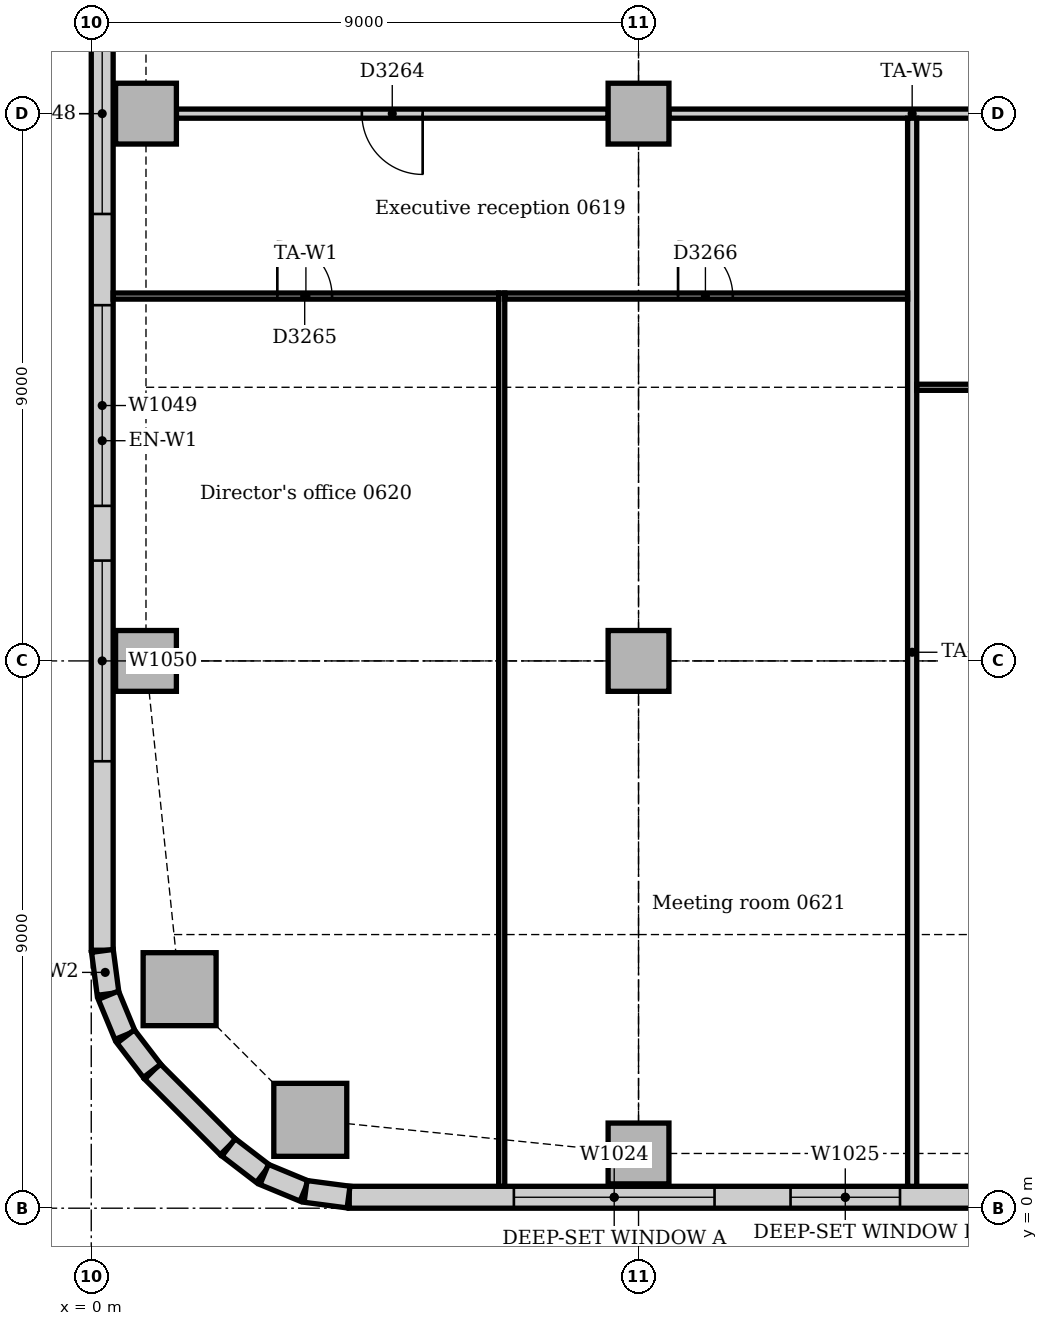
"""IFC4 building model, lengths in metres.
Left out: names, types, materials, properties, quantities, classifications, styles, units other than length and angle.
Written with IfcOpenShell. Run it as: python <this file> out.ifc"""

import sys

from ifc_helpers import new_model, si_unit, direction, frame, frame_2d, origin, origin_2d, place, context, subcontext, project, spatial, rectangle, extrude, element, fill, save


model = new_model("IFC4")
c1 = context("Model", 3, precision=1e-05, world=origin(), true_north=direction((0.0, 1.0)))
c2 = subcontext(c1, "Body", "Model", "MODEL_VIEW")
j1 = project(units=[si_unit("LENGTHUNIT", "METRE"), si_unit("PLANEANGLEUNIT", "RADIAN")], contexts=[c1])
p1 = place(None, origin())
s1 = spatial("IfcSite", under=j1, at=p1, CompositionType="ELEMENT")
p2 = place(p1, origin())
s2 = spatial("IfcBuilding", under=s1, at=p2, CompositionType="ELEMENT")
p3 = place(p2, frame((0.0, 0.0, 30.0)))
s3 = spatial("IfcBuildingStorey", under=s2, at=p3, CompositionType="ELEMENT", Elevation=30.0)
for number, where, z_axis, x_axis in (
    (1, (3.602, 1.453, 0.0), (0.0, 0.0, 1.0), (1.0, 0.0, 0.0)),
    (2, (1.453, 3.602, 0.0), (0.0, 0.0, 1.0), (1.0, 0.0, 0.0)),
):
    element("IfcColumn", number, at=place(p3, frame(where, z_axis=z_axis, x_axis=x_axis)), inside=s3, PredefinedType="COLUMN", context=c2, shape_type="SweptSolid", body=[
        extrude(rectangle(XDim=1.2, YDim=1.2, at=origin_2d()), origin(), (0.0, 0.0, 1.0), 3.85),
    ])
for number, where, z_axis, x_axis in (
    (3, (9.0, 0.9, 0.0), (0.0, 0.0, 1.0), (1.0, 0.0, 0.0)),
    (4, (0.9, 9.0, 0.0), (0.0, 0.0, 1.0), (1.0, 0.0, 0.0)),
    (5, (0.9, 18.0, 0.0), (0.0, 0.0, 1.0), (1.0, 0.0, 0.0)),
    (6, (9.0, 9.0, 0.0), (0.0, 0.0, 1.0), (1.0, 0.0, 0.0)),
    (7, (9.0, 18.0, 0.0), (0.0, 0.0, 1.0), (1.0, 0.0, 0.0)),
):
    element("IfcColumn", number, at=place(p3, frame(where, z_axis=z_axis, x_axis=x_axis)), inside=s3, PredefinedType="COLUMN", context=c2, shape_type="SweptSolid", body=[
        extrude(rectangle(XDim=1.0, YDim=1.0, at=origin_2d()), origin(), (0.0, 0.0, 1.0), 3.85),
    ])
p4 = place(p3, frame((4.243, 0.18, 0.0), z_axis=(0.0, 0.0, 1.0), x_axis=(1.0, 0.0, 0.0)))
e8 = element("IfcWall", 8, at=p4, inside=s3, PredefinedType="STANDARD", context=c2, shape_type="SweptSolid", body=[
    extrude(rectangle(XDim=44.015, YDim=0.36, at=frame_2d((22.007, 0.0))), origin(), (0.0, 0.0, 1.0), 3.85),
])
p5 = place(p4, frame((2.707, 0.0, 0.9)))
e9 = element("IfcOpeningElement", 9, at=p5, cuts=e8, PredefinedType="OPENING", context=c2, shape_type="SweptSolid", body=[
    extrude(rectangle(XDim=3.3, YDim=1.6, at=frame_2d((1.65, 0.8))), frame((0.0, 0.19, 0.0), z_axis=(0.0, -1.0, 0.0), x_axis=(1.0, 0.0, 0.0)), (0.0, 0.0, 1.0), 0.38),
])
p6 = place(p4, frame((7.257, 0.0, 0.9)))
e10 = element("IfcOpeningElement", 10, at=p6, cuts=e8, PredefinedType="OPENING", context=c2, shape_type="SweptSolid", body=[
    extrude(rectangle(XDim=1.8, YDim=1.6, at=frame_2d((0.9, 0.8))), frame((0.0, 0.19, 0.0), z_axis=(0.0, -1.0, 0.0), x_axis=(1.0, 0.0, 0.0)), (0.0, 0.0, 1.0), 0.38),
])
p7 = place(p4, frame((11.357, 0.0, 0.9)))
e11 = element("IfcOpeningElement", 11, at=p7, cuts=e8, PredefinedType="OPENING", context=c2, shape_type="SweptSolid", body=[
    extrude(rectangle(XDim=3.3, YDim=1.6, at=frame_2d((1.65, 0.8))), frame((0.0, 0.19, 0.0), z_axis=(0.0, -1.0, 0.0), x_axis=(1.0, 0.0, 0.0)), (0.0, 0.0, 1.0), 0.38),
])
p8 = place(p4, frame((16.307, 0.0, 0.9)))
e12 = element("IfcOpeningElement", 12, at=p8, cuts=e8, PredefinedType="OPENING", context=c2, shape_type="SweptSolid", body=[
    extrude(rectangle(XDim=1.8, YDim=1.6, at=frame_2d((0.9, 0.8))), frame((0.0, 0.19, 0.0), z_axis=(0.0, -1.0, 0.0), x_axis=(1.0, 0.0, 0.0)), (0.0, 0.0, 1.0), 0.38),
])
p9 = place(p4, frame((20.357, 0.0, 0.9)))
e13 = element("IfcOpeningElement", 13, at=p9, cuts=e8, PredefinedType="OPENING", context=c2, shape_type="SweptSolid", body=[
    extrude(rectangle(XDim=3.3, YDim=1.6, at=frame_2d((1.65, 0.8))), frame((0.0, 0.19, 0.0), z_axis=(0.0, -1.0, 0.0), x_axis=(1.0, 0.0, 0.0)), (0.0, 0.0, 1.0), 0.38),
])
p10 = place(p4, frame((25.307, 0.0, 0.9)))
e14 = element("IfcOpeningElement", 14, at=p10, cuts=e8, PredefinedType="OPENING", context=c2, shape_type="SweptSolid", body=[
    extrude(rectangle(XDim=1.8, YDim=1.6, at=frame_2d((0.9, 0.8))), frame((0.0, 0.19, 0.0), z_axis=(0.0, -1.0, 0.0), x_axis=(1.0, 0.0, 0.0)), (0.0, 0.0, 1.0), 0.38),
])
p11 = place(p4, frame((29.357, 0.0, 0.9)))
e15 = element("IfcOpeningElement", 15, at=p11, cuts=e8, PredefinedType="OPENING", context=c2, shape_type="SweptSolid", body=[
    extrude(rectangle(XDim=3.3, YDim=1.6, at=frame_2d((1.65, 0.8))), frame((0.0, 0.19, 0.0), z_axis=(0.0, -1.0, 0.0), x_axis=(1.0, 0.0, 0.0)), (0.0, 0.0, 1.0), 0.38),
])
p12 = place(p4, frame((33.857, 0.0, 0.9)))
e16 = element("IfcOpeningElement", 16, at=p12, cuts=e8, PredefinedType="OPENING", context=c2, shape_type="SweptSolid", body=[
    extrude(rectangle(XDim=3.3, YDim=1.6, at=frame_2d((1.65, 0.8))), frame((0.0, 0.19, 0.0), z_axis=(0.0, -1.0, 0.0), x_axis=(1.0, 0.0, 0.0)), (0.0, 0.0, 1.0), 0.38),
])
p13 = place(p4, frame((38.357, 0.0, 0.9)))
e17 = element("IfcOpeningElement", 17, at=p13, cuts=e8, PredefinedType="OPENING", context=c2, shape_type="SweptSolid", body=[
    extrude(rectangle(XDim=3.3, YDim=1.6, at=frame_2d((1.65, 0.8))), frame((0.0, 0.19, 0.0), z_axis=(0.0, -1.0, 0.0), x_axis=(1.0, 0.0, 0.0)), (0.0, 0.0, 1.0), 0.38),
])
p14 = place(p3, frame((0.18, 21.0, 0.0), z_axis=(0.0, 0.0, 1.0), x_axis=(0.0, -1.0, 0.0)))
e18 = element("IfcWall", 18, at=p14, inside=s3, PredefinedType="STANDARD", context=c2, shape_type="SweptSolid", body=[
    extrude(rectangle(XDim=16.757, YDim=0.36, at=frame_2d((8.379, 0.0))), origin(), (0.0, 0.0, 1.0), 3.85),
])
p15 = place(p14, frame((1.35, 0.0, 0.9)))
e19 = element("IfcOpeningElement", 19, at=p15, cuts=e18, PredefinedType="OPENING", context=c2, shape_type="SweptSolid", body=[
    extrude(rectangle(XDim=3.3, YDim=1.6, at=frame_2d((1.65, 0.8))), frame((0.0, 0.19, 0.0), z_axis=(0.0, -1.0, 0.0), x_axis=(1.0, 0.0, 0.0)), (0.0, 0.0, 1.0), 0.38),
])
p16 = place(p14, frame((6.15, 0.0, 0.9)))
e20 = element("IfcOpeningElement", 20, at=p16, cuts=e18, PredefinedType="OPENING", context=c2, shape_type="SweptSolid", body=[
    extrude(rectangle(XDim=3.3, YDim=1.6, at=frame_2d((1.65, 0.8))), frame((0.0, 0.19, 0.0), z_axis=(0.0, -1.0, 0.0), x_axis=(1.0, 0.0, 0.0)), (0.0, 0.0, 1.0), 0.38),
])
p17 = place(p14, frame((10.35, 0.0, 0.9)))
e21 = element("IfcOpeningElement", 21, at=p17, cuts=e18, PredefinedType="OPENING", context=c2, shape_type="SweptSolid", body=[
    extrude(rectangle(XDim=3.3, YDim=1.6, at=frame_2d((1.65, 0.8))), frame((0.0, 0.19, 0.0), z_axis=(0.0, -1.0, 0.0), x_axis=(1.0, 0.0, 0.0)), (0.0, 0.0, 1.0), 0.38),
])
p18 = place(p3, frame((1.006, 2.249, 0.0), z_axis=(0.0, 0.0, 1.0), x_axis=(0.707106781187, -0.707106781187, 0.0)))
e22 = element("IfcWall", 22, at=p18, inside=s3, PredefinedType="STANDARD", context=c2, shape_type="SweptSolid", body=[
    extrude(rectangle(XDim=1.757, YDim=0.36, at=frame_2d((0.879, 0.0))), origin(), (0.0, 0.0, 1.0), 3.85),
])
for number, where, z_axis, x_axis in (
    (23, (0.183, 4.231, 0.0), (0.0, 0.0, 1.0), (0.131, -0.991, 0.0)),
    (24, (0.282, 3.503, 0.0), (0.0, 0.0, 1.0), (0.383, -0.924, 0.0)),
):
    element("IfcWall", number, at=place(p3, frame(where, z_axis=z_axis, x_axis=x_axis)), inside=s3, PredefinedType="STANDARD", context=c2, shape_type="SweptSolid", body=[
        extrude(rectangle(XDim=0.713, YDim=0.36, at=frame_2d((0.356, 0.0))), origin(), (0.0, 0.0, 1.0), 3.85),
    ])
for number, where, z_axis, x_axis in (
    (25, (0.566, 2.825, 0.0), (0.0, 0.0, 1.0), (0.609, -0.793, 0.0)),
    (26, (2.259, 1.0, 0.0), (0.0, 0.0, 1.0), (0.793, -0.609, 0.0)),
):
    element("IfcWall", number, at=place(p3, frame(where, z_axis=z_axis, x_axis=x_axis)), inside=s3, PredefinedType="STANDARD", context=c2, shape_type="SweptSolid", body=[
        extrude(rectangle(XDim=0.713, YDim=0.36, at=frame_2d((0.357, 0.0))), origin(), (0.0, 0.0, 1.0), 3.85),
    ])
for number, where, z_axis, x_axis in (
    (27, (2.844, 0.555, 0.0), (0.0, 0.0, 1.0), (0.924, -0.383, 0.0)),
    (28, (3.524, 0.276, 0.0), (0.0, 0.0, 1.0), (0.991, -0.131, 0.0)),
):
    element("IfcWall", number, at=place(p3, frame(where, z_axis=z_axis, x_axis=x_axis)), inside=s3, PredefinedType="STANDARD", context=c2, shape_type="SweptSolid", body=[
        extrude(rectangle(XDim=0.713, YDim=0.36, at=frame_2d((0.356, 0.0))), origin(), (0.0, 0.0, 1.0), 3.85),
    ])
p19 = place(p3, frame((9.5, 18.0, 0.0), z_axis=(0.0, 0.0, 1.0), x_axis=(1.0, 0.0, 0.0)))
e29 = element("IfcWall", 29, at=p19, inside=s3, PredefinedType="PARTITIONING", context=c2, shape_type="SweptSolid", body=[
    extrude(rectangle(XDim=8.0, YDim=0.15, at=frame_2d((4.0, 0.0))), origin(), (0.0, 0.0, 1.0), 3.15),
])
p20 = place(p3, frame((1.4, 18.0, 0.0), z_axis=(0.0, 0.0, 1.0), x_axis=(1.0, 0.0, 0.0)))
e30 = element("IfcWall", 30, at=p20, inside=s3, PredefinedType="PARTITIONING", context=c2, shape_type="SweptSolid", body=[
    extrude(rectangle(XDim=7.1, YDim=0.15, at=frame_2d((3.55, 0.0))), origin(), (0.0, 0.0, 1.0), 3.15),
])
p21 = place(p20, frame((3.05, 0.0, 0.0)))
e31 = element("IfcOpeningElement", 31, at=p21, cuts=e30, PredefinedType="OPENING", context=c2, shape_type="SweptSolid", body=[
    extrude(rectangle(XDim=1.0, YDim=2.1, at=frame_2d((0.5, 1.05))), frame((0.0, 0.085, 0.0), z_axis=(0.0, -1.0, 0.0), x_axis=(1.0, 0.0, 0.0)), (0.0, 0.0, 1.0), 0.17),
])
p22 = place(p3, frame((13.5, 0.36, 0.0), z_axis=(0.0, 0.0, 1.0), x_axis=(0.0, 1.0, 0.0)))
e32 = element("IfcWall", 32, at=p22, inside=s3, PredefinedType="PARTITIONING", context=c2, shape_type="SweptSolid", body=[
    extrude(rectangle(XDim=17.565, YDim=0.15, at=frame_2d((8.783, 0.0))), origin(), (0.0, 0.0, 1.0), 3.85),
])
p23 = place(p3, frame((13.575, 13.5, 0.0), z_axis=(0.0, 0.0, 1.0), x_axis=(1.0, 0.0, 0.0)))
e33 = element("IfcWall", 33, at=p23, inside=s3, PredefinedType="PARTITIONING", context=c2, shape_type="SweptSolid", body=[
    extrude(rectangle(XDim=17.975, YDim=0.1, at=frame_2d((8.988, 0.0))), origin(), (0.0, 0.0, 1.0), 3.35),
])
p24 = place(p23, frame((4.1, 0.0, 0.0)))
e34 = element("IfcOpeningElement", 34, at=p24, cuts=e33, PredefinedType="OPENING", context=c2, shape_type="SweptSolid", body=[
    extrude(rectangle(XDim=0.9, YDim=2.1, at=frame_2d((0.45, 1.05))), frame((0.0, 0.06, 0.0), z_axis=(0.0, -1.0, 0.0), x_axis=(1.0, 0.0, 0.0)), (0.0, 0.0, 1.0), 0.12),
])
p25 = place(p23, frame((12.925, 0.0, 0.0)))
e35 = element("IfcOpeningElement", 35, at=p25, cuts=e33, PredefinedType="OPENING", context=c2, shape_type="SweptSolid", body=[
    extrude(rectangle(XDim=0.9, YDim=2.1, at=frame_2d((0.45, 1.05))), frame((0.0, 0.06, 0.0), z_axis=(0.0, -1.0, 0.0), x_axis=(1.0, 0.0, 0.0)), (0.0, 0.0, 1.0), 0.12),
])
p26 = place(p3, frame((6.75, 0.36, 0.0), z_axis=(0.0, 0.0, 1.0), x_axis=(0.0, 1.0, 0.0)))
e36 = element("IfcWall", 36, at=p26, inside=s3, PredefinedType="PARTITIONING", context=c2, shape_type="SweptSolid", body=[
    extrude(rectangle(XDim=14.69, YDim=0.1, at=frame_2d((7.345, 0.0))), origin(), (0.0, 0.0, 1.0), 3.85),
])
p27 = place(p3, frame((6.8, 15.0, 0.0), z_axis=(0.0, 0.0, 1.0), x_axis=(1.0, 0.0, 0.0)))
e37 = element("IfcWall", 37, at=p27, inside=s3, PredefinedType="PARTITIONING", context=c2, shape_type="SweptSolid", body=[
    extrude(rectangle(XDim=6.625, YDim=0.1, at=frame_2d((3.312, 0.0))), origin(), (0.0, 0.0, 1.0), 3.85),
])
p28 = place(p27, frame((2.85, 0.0, 0.0)))
e38 = element("IfcOpeningElement", 38, at=p28, cuts=e37, PredefinedType="OPENING", context=c2, shape_type="SweptSolid", body=[
    extrude(rectangle(XDim=0.9, YDim=2.1, at=frame_2d((0.45, 1.05))), frame((0.0, 0.06, 0.0), z_axis=(0.0, -1.0, 0.0), x_axis=(1.0, 0.0, 0.0)), (0.0, 0.0, 1.0), 0.12),
])
p29 = place(p3, frame((0.36, 15.0, 0.0), z_axis=(0.0, 0.0, 1.0), x_axis=(1.0, 0.0, 0.0)))
e39 = element("IfcWall", 39, at=p29, inside=s3, PredefinedType="PARTITIONING", context=c2, shape_type="SweptSolid", body=[
    extrude(rectangle(XDim=6.34, YDim=0.1, at=frame_2d((3.17, 0.0))), origin(), (0.0, 0.0, 1.0), 3.85),
])
p30 = place(p29, frame((2.7, 0.0, 0.0)))
e40 = element("IfcOpeningElement", 40, at=p30, cuts=e39, PredefinedType="OPENING", context=c2, shape_type="SweptSolid", body=[
    extrude(rectangle(XDim=0.9, YDim=2.1, at=frame_2d((0.45, 1.05))), frame((0.0, 0.06, 0.0), z_axis=(0.0, -1.0, 0.0), x_axis=(1.0, 0.0, 0.0)), (0.0, 0.0, 1.0), 0.12),
])
p31 = place(p5, origin())
e41 = element("IfcWindow", 41, at=p31, inside=s3, PartitioningType="SINGLE_PANEL", PredefinedType="WINDOW", context=c2, shape_type="SweptSolid", body=[
    extrude(rectangle(XDim=3.3, YDim=1.6, at=frame_2d((1.65, 0.8))), frame((0.0, 0.13, 0.0), z_axis=(0.0, -1.0, 0.0), x_axis=(1.0, 0.0, 0.0)), (0.0, 0.0, 1.0), 0.06),
])
fill(e9, e41)
p32 = place(p6, origin())
e42 = element("IfcWindow", 42, at=p32, inside=s3, PartitioningType="SINGLE_PANEL", PredefinedType="WINDOW", context=c2, shape_type="SweptSolid", body=[
    extrude(rectangle(XDim=1.8, YDim=1.6, at=frame_2d((0.9, 0.8))), frame((0.0, 0.13, 0.0), z_axis=(0.0, -1.0, 0.0), x_axis=(1.0, 0.0, 0.0)), (0.0, 0.0, 1.0), 0.06),
])
fill(e10, e42)
p33 = place(p15, origin())
e43 = element("IfcWindow", 43, at=p33, inside=s3, PartitioningType="SINGLE_PANEL", PredefinedType="WINDOW", context=c2, shape_type="SweptSolid", body=[
    extrude(rectangle(XDim=3.3, YDim=1.6, at=frame_2d((1.65, 0.8))), frame((0.0, 0.13, 0.0), z_axis=(0.0, -1.0, 0.0), x_axis=(1.0, 0.0, 0.0)), (0.0, 0.0, 1.0), 0.06),
])
fill(e19, e43)
p34 = place(p16, origin())
e44 = element("IfcWindow", 44, at=p34, inside=s3, PartitioningType="SINGLE_PANEL", PredefinedType="WINDOW", context=c2, shape_type="SweptSolid", body=[
    extrude(rectangle(XDim=3.3, YDim=1.6, at=frame_2d((1.65, 0.8))), frame((0.0, 0.13, 0.0), z_axis=(0.0, -1.0, 0.0), x_axis=(1.0, 0.0, 0.0)), (0.0, 0.0, 1.0), 0.06),
])
fill(e20, e44)
p35 = place(p17, origin())
e45 = element("IfcWindow", 45, at=p35, inside=s3, PartitioningType="SINGLE_PANEL", PredefinedType="WINDOW", context=c2, shape_type="SweptSolid", body=[
    extrude(rectangle(XDim=3.3, YDim=1.6, at=frame_2d((1.65, 0.8))), frame((0.0, 0.13, 0.0), z_axis=(0.0, -1.0, 0.0), x_axis=(1.0, 0.0, 0.0)), (0.0, 0.0, 1.0), 0.06),
])
fill(e21, e45)
p36 = place(p21, frame((1.0, 0.0, 0.0), z_axis=(0.0, 0.0, 1.0), x_axis=(-1.0, 0.0, 0.0)))
e46 = element("IfcDoor", 46, at=p36, inside=s3, OperationType="SINGLE_SWING_LEFT", PredefinedType="DOOR", context=c2, shape_type="SweptSolid", body=[
    extrude(rectangle(XDim=1.0, YDim=2.1, at=frame_2d((0.5, 1.05))), frame((0.0, 0.025, 0.0), z_axis=(0.0, -1.0, 0.0), x_axis=(1.0, 0.0, 0.0)), (0.0, 0.0, 1.0), 0.05),
])
fill(e31, e46)
p37 = place(p30, origin())
e47 = element("IfcDoor", 47, at=p37, inside=s3, OperationType="SINGLE_SWING_LEFT", PredefinedType="DOOR", context=c2, shape_type="SweptSolid", body=[
    extrude(rectangle(XDim=0.9, YDim=2.1, at=frame_2d((0.45, 1.05))), frame((0.0, 0.025, 0.0), z_axis=(0.0, -1.0, 0.0), x_axis=(1.0, 0.0, 0.0)), (0.0, 0.0, 1.0), 0.05),
])
fill(e40, e47)
p38 = place(p28, origin())
e48 = element("IfcDoor", 48, at=p38, inside=s3, OperationType="SINGLE_SWING_LEFT", PredefinedType="DOOR", context=c2, shape_type="SweptSolid", body=[
    extrude(rectangle(XDim=0.9, YDim=2.1, at=frame_2d((0.45, 1.05))), frame((0.0, 0.025, 0.0), z_axis=(0.0, -1.0, 0.0), x_axis=(1.0, 0.0, 0.0)), (0.0, 0.0, 1.0), 0.05),
])
fill(e38, e48)
save(model, sys.argv[1])
